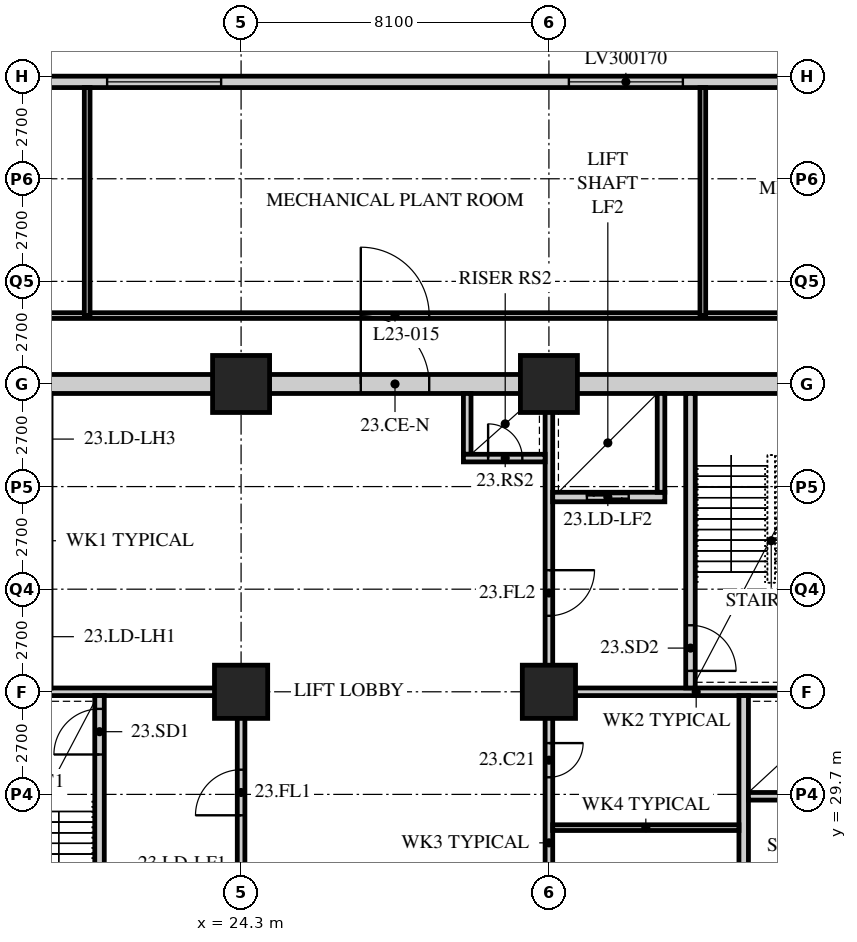
"""IFC4 building model, lengths in metres.
Left out: names, types, materials, properties, quantities, classifications, styles, units other than length and angle.
Written with IfcOpenShell. Run it as: python <this file> out.ifc"""

import sys

from ifc_helpers import new_model, si_unit, direction, frame, frame_2d, origin, origin_2d, place, context, subcontext, project, spatial, rectangle, hollow_rectangle, extrude, element, fill, save


model = new_model("IFC4")
c1 = context("Model", 3, precision=1e-05, world=origin(), true_north=direction((0.0, 1.0)))
c2 = subcontext(c1, "Body", "Model", "MODEL_VIEW")
j1 = project(units=[si_unit("LENGTHUNIT", "METRE"), si_unit("PLANEANGLEUNIT", "RADIAN")], contexts=[c1])
p1 = place(None, origin())
s1 = spatial("IfcSite", under=j1, at=p1, CompositionType="ELEMENT")
p2 = place(p1, origin())
s2 = spatial("IfcBuilding", under=s1, at=p2, CompositionType="ELEMENT")
p3 = place(p2, frame((0.0, 0.0, 90.8)))
s3 = spatial("IfcBuildingStorey", under=s2, at=p3, CompositionType="ELEMENT", Elevation=90.8)
p4 = place(p3, frame((24.3, 32.4, 0.0), z_axis=(0.0, 0.0, 1.0), x_axis=(1.0, 0.0, 0.0)))
e1 = element("IfcColumn", 1, at=p4, inside=s3, PredefinedType="COLUMN", context=c2, shape_type="SweptSolid", body=[
    extrude(hollow_rectangle(XDim=1.4, YDim=1.4, WallThickness=0.12, at=origin_2d()), origin(), (0.0, 0.0, 1.0), 7.2),
])
p5 = place(p3, frame((24.3, 40.5, 0.0), z_axis=(0.0, 0.0, 1.0), x_axis=(1.0, 0.0, 0.0)))
e2 = element("IfcColumn", 2, at=p5, inside=s3, PredefinedType="COLUMN", context=c2, shape_type="SweptSolid", body=[
    extrude(hollow_rectangle(XDim=1.5, YDim=1.5, WallThickness=0.13, at=origin_2d()), origin(), (0.0, 0.0, 1.0), 7.2),
])
p6 = place(p3, frame((32.4, 32.4, 0.0), z_axis=(0.0, 0.0, 1.0), x_axis=(1.0, 0.0, 0.0)))
e3 = element("IfcColumn", 3, at=p6, inside=s3, PredefinedType="COLUMN", context=c2, shape_type="SweptSolid", body=[
    extrude(hollow_rectangle(XDim=1.4, YDim=1.4, WallThickness=0.12, at=origin_2d()), origin(), (0.0, 0.0, 1.0), 7.2),
])
p7 = place(p3, frame((32.4, 40.5, 0.0), z_axis=(0.0, 0.0, 1.0), x_axis=(1.0, 0.0, 0.0)))
e4 = element("IfcColumn", 4, at=p7, inside=s3, PredefinedType="COLUMN", context=c2, shape_type="SweptSolid", body=[
    extrude(hollow_rectangle(XDim=1.5, YDim=1.5, WallThickness=0.13, at=origin_2d()), origin(), (0.0, 0.0, 1.0), 7.2),
])
p8 = place(p3, frame((48.3, 48.45, 0.0), z_axis=(0.0, 0.0, 1.0), x_axis=(-1.0, 0.0, 0.0)))
e5 = element("IfcWall", 5, at=p8, inside=s3, PredefinedType="SOLIDWALL", context=c2, shape_type="SweptSolid", body=[
    extrude(rectangle(XDim=40.2, YDim=0.3, at=frame_2d((20.1, 0.0))), origin(), (0.0, 0.0, 1.0), 5.85),
])
p9 = place(p8, frame((4.275, 0.0, 1.0)))
e6 = element("IfcOpeningElement", 6, at=p9, cuts=e5, PredefinedType="OPENING", context=c2, shape_type="SweptSolid", body=[
    extrude(rectangle(XDim=3.0, YDim=1.7, at=frame_2d((1.5, 0.85))), frame((0.0, 0.16, 0.0), z_axis=(0.0, -1.0, 0.0), x_axis=(1.0, 0.0, 0.0)), (0.0, 0.0, 1.0), 0.32),
])
p10 = place(p8, frame((12.375, 0.0, 1.0)))
e7 = element("IfcOpeningElement", 7, at=p10, cuts=e5, PredefinedType="OPENING", context=c2, shape_type="SweptSolid", body=[
    extrude(rectangle(XDim=3.0, YDim=1.7, at=frame_2d((1.5, 0.85))), frame((0.0, 0.16, 0.0), z_axis=(0.0, -1.0, 0.0), x_axis=(1.0, 0.0, 0.0)), (0.0, 0.0, 1.0), 0.32),
])
p11 = place(p8, frame((24.525, 0.0, 1.0)))
e8 = element("IfcOpeningElement", 8, at=p11, cuts=e5, PredefinedType="OPENING", context=c2, shape_type="SweptSolid", body=[
    extrude(rectangle(XDim=3.0, YDim=1.7, at=frame_2d((1.5, 0.85))), frame((0.0, 0.16, 0.0), z_axis=(0.0, -1.0, 0.0), x_axis=(1.0, 0.0, 0.0)), (0.0, 0.0, 1.0), 0.32),
])
p12 = place(p8, frame((32.625, 0.0, 1.0)))
e9 = element("IfcOpeningElement", 9, at=p12, cuts=e5, PredefinedType="OPENING", context=c2, shape_type="SweptSolid", body=[
    extrude(rectangle(XDim=3.0, YDim=1.7, at=frame_2d((1.5, 0.85))), frame((0.0, 0.16, 0.0), z_axis=(0.0, -1.0, 0.0), x_axis=(1.0, 0.0, 0.0)), (0.0, 0.0, 1.0), 0.32),
])
p13 = place(p3, frame((8.1, 42.3, 0.0), z_axis=(0.0, 0.0, 1.0), x_axis=(1.0, 0.0, 0.0)))
e10 = element("IfcWall", 10, at=p13, inside=s3, PredefinedType="PARTITIONING", context=c2, shape_type="SweptSolid", body=[
    extrude(rectangle(XDim=40.5, YDim=0.15, at=frame_2d((20.25, 0.0))), origin(), (0.0, 0.0, 1.0), 6.95),
])
p14 = place(p13, frame((8.7, 0.0, 0.0)))
e11 = element("IfcOpeningElement", 11, at=p14, cuts=e10, PredefinedType="OPENING", context=c2, shape_type="SweptSolid", body=[
    extrude(rectangle(XDim=1.8, YDim=2.4, at=frame_2d((0.9, 1.2))), frame((0.0, 0.085, 0.0), z_axis=(0.0, -1.0, 0.0), x_axis=(1.0, 0.0, 0.0)), (0.0, 0.0, 1.0), 0.17),
])
p15 = place(p13, frame((19.35, 0.0, 0.0)))
e12 = element("IfcOpeningElement", 12, at=p15, cuts=e10, PredefinedType="OPENING", context=c2, shape_type="SweptSolid", body=[
    extrude(rectangle(XDim=1.8, YDim=2.4, at=frame_2d((0.9, 1.2))), frame((0.0, 0.085, 0.0), z_axis=(0.0, -1.0, 0.0), x_axis=(1.0, 0.0, 0.0)), (0.0, 0.0, 1.0), 0.17),
])
p16 = place(p13, frame((33.0, 0.0, 0.0)))
e13 = element("IfcOpeningElement", 13, at=p16, cuts=e10, PredefinedType="OPENING", context=c2, shape_type="SweptSolid", body=[
    extrude(rectangle(XDim=1.8, YDim=2.4, at=frame_2d((0.9, 1.2))), frame((0.0, 0.085, 0.0), z_axis=(0.0, -1.0, 0.0), x_axis=(1.0, 0.0, 0.0)), (0.0, 0.0, 1.0), 0.17),
])
p17 = place(p13, frame((37.975, 0.0, 0.0)))
e14 = element("IfcOpeningElement", 14, at=p17, cuts=e10, PredefinedType="OPENING", context=c2, shape_type="SweptSolid", body=[
    extrude(rectangle(XDim=1.0, YDim=2.1, at=frame_2d((0.5, 1.05))), frame((0.0, 0.085, 0.0), z_axis=(0.0, -1.0, 0.0), x_axis=(1.0, 0.0, 0.0)), (0.0, 0.0, 1.0), 0.17),
])
p18 = place(p13, frame((1.525, 0.0, 0.0)))
e15 = element("IfcOpeningElement", 15, at=p18, cuts=e10, PredefinedType="OPENING", context=c2, shape_type="SweptSolid", body=[
    extrude(rectangle(XDim=1.0, YDim=2.1, at=frame_2d((0.5, 1.05))), frame((0.0, 0.085, 0.0), z_axis=(0.0, -1.0, 0.0), x_axis=(1.0, 0.0, 0.0)), (0.0, 0.0, 1.0), 0.17),
])
for number, where, z_axis, x_axis in (
    (16, (20.25, 42.3, 0.0), (0.0, 0.0, 1.0), (0.0, 1.0, 0.0)),
    (17, (36.45, 42.3, 0.0), (0.0, 0.0, 1.0), (0.0, 1.0, 0.0)),
):
    element("IfcWall", number, at=place(p3, frame(where, z_axis=z_axis, x_axis=x_axis)), inside=s3, PredefinedType="PARTITIONING", context=c2, shape_type="SweptSolid", body=[
        extrude(rectangle(XDim=6.0, YDim=0.15, at=frame_2d((3.0, 0.0))), origin(), (0.0, 0.0, 1.0), 6.95),
    ])
p19 = place(p3, frame((15.95, 40.5, 0.0), z_axis=(0.0, 0.0, 1.0), x_axis=(1.0, 0.0, 0.0)))
e18 = element("IfcWall", 18, at=p19, inside=s3, PredefinedType="SOLIDWALL", context=c2, shape_type="SweptSolid", body=[
    extrude(rectangle(XDim=24.8, YDim=0.5, at=frame_2d((12.4, 0.0))), origin(), (0.0, 0.0, 1.0), 6.188),
])
p20 = place(p19, frame((11.5, 0.0, 0.0)))
e19 = element("IfcOpeningElement", 19, at=p20, cuts=e18, PredefinedType="OPENING", context=c2, shape_type="SweptSolid", body=[
    extrude(rectangle(XDim=1.8, YDim=2.4, at=frame_2d((0.9, 1.2))), frame((0.0, 0.26, 0.0), z_axis=(0.0, -1.0, 0.0), x_axis=(1.0, 0.0, 0.0)), (0.0, 0.0, 1.0), 0.52),
])
p21 = place(p3, frame((16.45, 32.4, 0.0), z_axis=(0.0, 0.0, 1.0), x_axis=(1.0, 0.0, 0.0)))
e20 = element("IfcWall", 20, at=p21, inside=s3, PredefinedType="SOLIDWALL", context=c2, shape_type="SweptSolid", body=[
    extrude(rectangle(XDim=7.95, YDim=0.2, at=frame_2d((3.975, 0.0))), origin(), (0.0, 0.0, 1.0), 6.25),
])
p22 = place(p3, frame((24.3, 24.55, 0.0), z_axis=(0.0, 0.0, 1.0), x_axis=(0.0, 1.0, 0.0)))
e21 = element("IfcWall", 21, at=p22, inside=s3, PredefinedType="SOLIDWALL", context=c2, shape_type="SweptSolid", body=[
    extrude(rectangle(XDim=7.75, YDim=0.2, at=frame_2d((3.875, 0.0))), origin(), (0.0, 0.0, 1.0), 6.25),
])
p23 = place(p22, frame((4.6, 0.0, 0.0)))
e22 = element("IfcOpeningElement", 22, at=p23, cuts=e21, PredefinedType="OPENING", context=c2, shape_type="SweptSolid", body=[
    extrude(rectangle(XDim=1.2, YDim=2.1, at=frame_2d((0.6, 1.05))), frame((0.0, 0.11, 0.0), z_axis=(0.0, -1.0, 0.0), x_axis=(1.0, 0.0, 0.0)), (0.0, 0.0, 1.0), 0.22),
])
p24 = place(p3, frame((20.575, 24.55, 0.0), z_axis=(0.0, 0.0, 1.0), x_axis=(0.0, 1.0, 0.0)))
e23 = element("IfcWall", 23, at=p24, inside=s3, PredefinedType="SOLIDWALL", context=c2, shape_type="SweptSolid", body=[
    extrude(rectangle(XDim=7.75, YDim=0.25, at=frame_2d((3.875, 0.0))), origin(), (0.0, 0.0, 1.0), 6.95),
])
p25 = place(p24, frame((6.2, 0.0, 0.0)))
e24 = element("IfcOpeningElement", 24, at=p25, cuts=e23, PredefinedType="OPENING", context=c2, shape_type="SweptSolid", body=[
    extrude(rectangle(XDim=1.2, YDim=2.1, at=frame_2d((0.6, 1.05))), frame((0.0, 0.135, 0.0), z_axis=(0.0, -1.0, 0.0), x_axis=(1.0, 0.0, 0.0)), (0.0, 0.0, 1.0), 0.27),
])
p26 = place(p3, frame((32.3, 32.4, 0.0), z_axis=(0.0, 0.0, 1.0), x_axis=(1.0, 0.0, 0.0)))
e25 = element("IfcWall", 25, at=p26, inside=s3, PredefinedType="SOLIDWALL", context=c2, shape_type="SweptSolid", body=[
    extrude(rectangle(XDim=7.95, YDim=0.2, at=frame_2d((3.975, 0.0))), origin(), (0.0, 0.0, 1.0), 6.25),
])
p27 = place(p3, frame((32.4, 32.5, 0.0), z_axis=(0.0, 0.0, 1.0), x_axis=(0.0, 1.0, 0.0)))
e26 = element("IfcWall", 26, at=p27, inside=s3, PredefinedType="SOLIDWALL", context=c2, shape_type="SweptSolid", body=[
    extrude(rectangle(XDim=7.75, YDim=0.2, at=frame_2d((3.875, 0.0))), origin(), (0.0, 0.0, 1.0), 6.25),
])
p28 = place(p27, frame((1.9, 0.0, 0.0)))
e27 = element("IfcOpeningElement", 27, at=p28, cuts=e26, PredefinedType="OPENING", context=c2, shape_type="SweptSolid", body=[
    extrude(rectangle(XDim=1.2, YDim=2.1, at=frame_2d((0.6, 1.05))), frame((0.0, 0.11, 0.0), z_axis=(0.0, -1.0, 0.0), x_axis=(1.0, 0.0, 0.0)), (0.0, 0.0, 1.0), 0.22),
])
p29 = place(p3, frame((37.525, 24.55, 0.0), z_axis=(0.0, 0.0, 1.0), x_axis=(0.0, 1.0, 0.0)))
e28 = element("IfcWall", 28, at=p29, inside=s3, PredefinedType="SOLIDWALL", context=c2, shape_type="SweptSolid", body=[
    extrude(rectangle(XDim=7.75, YDim=0.25, at=frame_2d((3.875, 0.0))), origin(), (0.0, 0.0, 1.0), 6.95),
])
p30 = place(p3, frame((37.65, 29.65, 0.0), z_axis=(0.0, 0.0, 1.0), x_axis=(1.0, 0.0, 0.0)))
e29 = element("IfcWall", 29, at=p30, inside=s3, PredefinedType="SOLIDWALL", context=c2, shape_type="SweptSolid", body=[
    extrude(rectangle(XDim=2.6, YDim=0.2, at=frame_2d((1.3, 0.0))), origin(), (0.0, 0.0, 1.0), 6.95),
])
p31 = place(p3, frame((36.125, 32.5, 0.0), z_axis=(0.0, 0.0, 1.0), x_axis=(0.0, 1.0, 0.0)))
e30 = element("IfcWall", 30, at=p31, inside=s3, PredefinedType="SOLIDWALL", context=c2, shape_type="SweptSolid", body=[
    extrude(rectangle(XDim=7.75, YDim=0.25, at=frame_2d((3.875, 0.0))), origin(), (0.0, 0.0, 1.0), 6.95),
])
p32 = place(p31, frame((0.45, 0.0, 0.0)))
e31 = element("IfcOpeningElement", 31, at=p32, cuts=e30, PredefinedType="OPENING", context=c2, shape_type="SweptSolid", body=[
    extrude(rectangle(XDim=1.2, YDim=2.1, at=frame_2d((0.6, 1.05))), frame((0.0, 0.135, 0.0), z_axis=(0.0, -1.0, 0.0), x_axis=(1.0, 0.0, 0.0)), (0.0, 0.0, 1.0), 0.27),
])
p33 = place(p3, frame((32.5, 37.525, 0.0), z_axis=(0.0, 0.0, 1.0), x_axis=(1.0, 0.0, 0.0)))
e32 = element("IfcWall", 32, at=p33, inside=s3, PredefinedType="SOLIDWALL", context=c2, shape_type="SweptSolid", body=[
    extrude(rectangle(XDim=2.95, YDim=0.25, at=frame_2d((1.475, 0.0))), origin(), (0.0, 0.0, 1.0), 6.95),
])
p34 = place(p33, frame((0.9, 0.0, 0.0)))
e33 = element("IfcOpeningElement", 33, at=p34, cuts=e32, PredefinedType="OPENING", context=c2, shape_type="SweptSolid", body=[
    extrude(rectangle(XDim=1.1, YDim=2.4, at=frame_2d((0.55, 1.2))), frame((0.0, 0.135, 0.0), z_axis=(0.0, -1.0, 0.0), x_axis=(1.0, 0.0, 0.0)), (0.0, 0.0, 1.0), 0.27),
])
p35 = place(p3, frame((35.35, 37.65, 0.0), z_axis=(0.0, 0.0, 1.0), x_axis=(0.0, 1.0, 0.0)))
e34 = element("IfcWall", 34, at=p35, inside=s3, PredefinedType="SOLIDWALL", context=c2, shape_type="SweptSolid", body=[
    extrude(rectangle(XDim=2.6, YDim=0.2, at=frame_2d((1.3, 0.0))), origin(), (0.0, 0.0, 1.0), 6.95),
])
p36 = place(p3, frame((30.25, 38.65, 0.0), z_axis=(0.0, 0.0, 1.0), x_axis=(0.0, 1.0, 0.0)))
e35 = element("IfcWall", 35, at=p36, inside=s3, PredefinedType="SOLIDWALL", context=c2, shape_type="SweptSolid", body=[
    extrude(rectangle(XDim=1.6, YDim=0.2, at=frame_2d((0.8, 0.0))), origin(), (0.0, 0.0, 1.0), 6.95),
])
p37 = place(p3, frame((30.15, 38.55, 0.0), z_axis=(0.0, 0.0, 1.0), x_axis=(1.0, 0.0, 0.0)))
e36 = element("IfcWall", 36, at=p37, inside=s3, PredefinedType="SOLIDWALL", context=c2, shape_type="SweptSolid", body=[
    extrude(rectangle(XDim=2.15, YDim=0.2, at=frame_2d((1.075, 0.0))), origin(), (0.0, 0.0, 1.0), 6.95),
])
p38 = place(p37, frame((0.65, 0.0, 0.0)))
e37 = element("IfcOpeningElement", 37, at=p38, cuts=e36, PredefinedType="OPENING", context=c2, shape_type="SweptSolid", body=[
    extrude(rectangle(XDim=0.9, YDim=2.1, at=frame_2d((0.45, 1.05))), frame((0.0, 0.11, 0.0), z_axis=(0.0, -1.0, 0.0), x_axis=(1.0, 0.0, 0.0)), (0.0, 0.0, 1.0), 0.22),
])
p39 = place(p3, frame((32.4, 24.55, 0.0), z_axis=(0.0, 0.0, 1.0), x_axis=(0.0, 1.0, 0.0)))
e38 = element("IfcWall", 38, at=p39, inside=s3, PredefinedType="PARTITIONING", context=c2, shape_type="SweptSolid", body=[
    extrude(rectangle(XDim=7.75, YDim=0.2, at=frame_2d((3.875, 0.0))), origin(), (0.0, 0.0, 1.0), 6.25),
])
p40 = place(p39, frame((1.65, 0.0, 0.0)))
e39 = element("IfcOpeningElement", 39, at=p40, cuts=e38, PredefinedType="OPENING", context=c2, shape_type="SweptSolid", body=[
    extrude(rectangle(XDim=0.9, YDim=2.1, at=frame_2d((0.45, 1.05))), frame((0.0, 0.11, 0.0), z_axis=(0.0, -1.0, 0.0), x_axis=(1.0, 0.0, 0.0)), (0.0, 0.0, 1.0), 0.22),
])
p41 = place(p39, frame((5.6, 0.0, 0.0)))
e40 = element("IfcOpeningElement", 40, at=p41, cuts=e38, PredefinedType="OPENING", context=c2, shape_type="SweptSolid", body=[
    extrude(rectangle(XDim=0.9, YDim=2.1, at=frame_2d((0.45, 1.05))), frame((0.0, 0.11, 0.0), z_axis=(0.0, -1.0, 0.0), x_axis=(1.0, 0.0, 0.0)), (0.0, 0.0, 1.0), 0.22),
])
p42 = place(p3, frame((32.5, 28.825, 0.0), z_axis=(0.0, 0.0, 1.0), x_axis=(1.0, 0.0, 0.0)))
e41 = element("IfcWall", 41, at=p42, inside=s3, PredefinedType="PARTITIONING", context=c2, shape_type="SweptSolid", body=[
    extrude(rectangle(XDim=4.9, YDim=0.15, at=frame_2d((2.45, 0.0))), origin(), (0.0, 0.0, 1.0), 6.95),
])
p43 = place(p10, origin())
e42 = element("IfcWindow", 42, at=p43, inside=s3, PartitioningType="SINGLE_PANEL", PredefinedType="USERDEFINED", context=c2, shape_type="SweptSolid", body=[
    extrude(rectangle(XDim=3.0, YDim=1.7, at=frame_2d((1.5, 0.85))), frame((0.0, 0.075, 0.0), z_axis=(0.0, -1.0, 0.0), x_axis=(1.0, 0.0, 0.0)), (0.0, 0.0, 1.0), 0.15),
])
fill(e7, e42)
p44 = place(p11, origin())
e43 = element("IfcWindow", 43, at=p44, inside=s3, PartitioningType="SINGLE_PANEL", PredefinedType="USERDEFINED", context=c2, shape_type="SweptSolid", body=[
    extrude(rectangle(XDim=3.0, YDim=1.7, at=frame_2d((1.5, 0.85))), frame((0.0, 0.075, 0.0), z_axis=(0.0, -1.0, 0.0), x_axis=(1.0, 0.0, 0.0)), (0.0, 0.0, 1.0), 0.15),
])
fill(e8, e43)
p45 = place(p15, origin())
e44 = element("IfcDoor", 44, at=p45, inside=s3, OperationType="DOUBLE_DOOR_SINGLE_SWING", PredefinedType="DOOR", context=c2, shape_type="SweptSolid", body=[
    extrude(rectangle(XDim=1.8, YDim=2.4, at=frame_2d((0.9, 1.2))), frame((0.0, 0.025, 0.0), z_axis=(0.0, -1.0, 0.0), x_axis=(1.0, 0.0, 0.0)), (0.0, 0.0, 1.0), 0.05),
])
fill(e12, e44)
p46 = place(p41, origin())
e45 = element("IfcDoor", 45, at=p46, inside=s3, OperationType="SINGLE_SWING_LEFT", PredefinedType="DOOR", context=c2, shape_type="SweptSolid", body=[
    extrude(rectangle(XDim=0.9, YDim=2.1, at=frame_2d((0.45, 1.05))), frame((0.0, 0.025, 0.0), z_axis=(0.0, -1.0, 0.0), x_axis=(1.0, 0.0, 0.0)), (0.0, 0.0, 1.0), 0.05),
])
fill(e40, e45)
p47 = place(p25, origin())
e46 = element("IfcDoor", 46, at=p47, inside=s3, OperationType="SINGLE_SWING_LEFT", PredefinedType="DOOR", context=c2, shape_type="SweptSolid", body=[
    extrude(rectangle(XDim=1.2, YDim=2.1, at=frame_2d((0.6, 1.05))), frame((0.0, 0.025, 0.0), z_axis=(0.0, -1.0, 0.0), x_axis=(1.0, 0.0, 0.0)), (0.0, 0.0, 1.0), 0.05),
])
fill(e24, e46)
p48 = place(p23, origin())
e47 = element("IfcDoor", 47, at=p48, inside=s3, OperationType="SINGLE_SWING_LEFT", PredefinedType="DOOR", context=c2, shape_type="SweptSolid", body=[
    extrude(rectangle(XDim=1.2, YDim=2.1, at=frame_2d((0.6, 1.05))), frame((0.0, 0.025, 0.0), z_axis=(0.0, -1.0, 0.0), x_axis=(1.0, 0.0, 0.0)), (0.0, 0.0, 1.0), 0.05),
])
fill(e22, e47)
p49 = place(p32, origin())
e48 = element("IfcDoor", 48, at=p49, inside=s3, OperationType="SINGLE_SWING_RIGHT", PredefinedType="DOOR", context=c2, shape_type="SweptSolid", body=[
    extrude(rectangle(XDim=1.2, YDim=2.1, at=frame_2d((0.6, 1.05))), frame((0.0, 0.025, 0.0), z_axis=(0.0, -1.0, 0.0), x_axis=(1.0, 0.0, 0.0)), (0.0, 0.0, 1.0), 0.05),
])
fill(e31, e48)
p50 = place(p28, origin())
e49 = element("IfcDoor", 49, at=p50, inside=s3, OperationType="SINGLE_SWING_LEFT", PredefinedType="DOOR", context=c2, shape_type="SweptSolid", body=[
    extrude(rectangle(XDim=1.2, YDim=2.1, at=frame_2d((0.6, 1.05))), frame((0.0, 0.025, 0.0), z_axis=(0.0, -1.0, 0.0), x_axis=(1.0, 0.0, 0.0)), (0.0, 0.0, 1.0), 0.05),
])
fill(e27, e49)
p51 = place(p38, origin())
e50 = element("IfcDoor", 50, at=p51, inside=s3, OperationType="SINGLE_SWING_LEFT", PredefinedType="DOOR", context=c2, shape_type="SweptSolid", body=[
    extrude(rectangle(XDim=0.9, YDim=2.1, at=frame_2d((0.45, 1.05))), frame((0.0, 0.025, 0.0), z_axis=(0.0, -1.0, 0.0), x_axis=(1.0, 0.0, 0.0)), (0.0, 0.0, 1.0), 0.05),
])
fill(e37, e50)
p52 = place(p34, origin())
e51 = element("IfcDoor", 51, at=p52, inside=s3, OperationType="DOUBLE_DOOR_SLIDING", PredefinedType="DOOR", context=c2, shape_type="SweptSolid", body=[
    extrude(rectangle(XDim=1.1, YDim=2.4, at=frame_2d((0.55, 1.2))), frame((0.0, 0.025, 0.0), z_axis=(0.0, -1.0, 0.0), x_axis=(1.0, 0.0, 0.0)), (0.0, 0.0, 1.0), 0.05),
])
fill(e33, e51)
p53 = place(p20, origin())
e52 = element("IfcDoor", 52, at=p53, inside=s3, OperationType="DOUBLE_DOOR_SINGLE_SWING", PredefinedType="DOOR", context=c2, shape_type="SweptSolid", body=[
    extrude(rectangle(XDim=1.8, YDim=2.4, at=frame_2d((0.9, 1.2))), frame((0.0, 0.025, 0.0), z_axis=(0.0, -1.0, 0.0), x_axis=(1.0, 0.0, 0.0)), (0.0, 0.0, 1.0), 0.05),
])
fill(e19, e52)
save(model, sys.argv[1])
